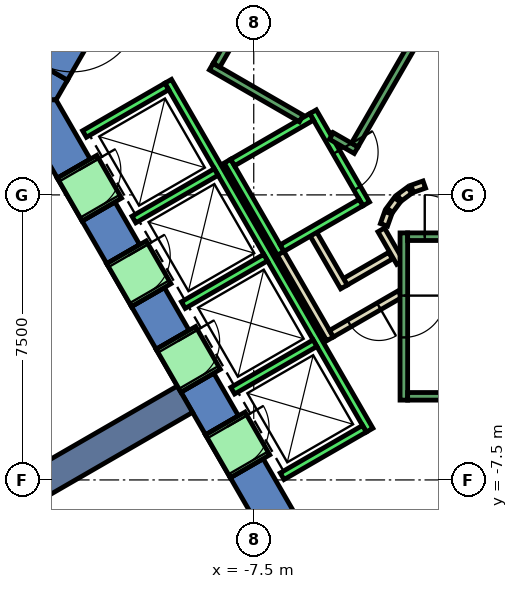
"""IFC4 building model, lengths in metres.
Left out: names, types, materials, properties, quantities, classifications, styles, units other than length and angle.
Written with IfcOpenShell. Run it as: python <this file> out.ifc"""

import sys

from ifc_helpers import new_model, si_unit, direction, frame, frame_2d, origin, place, context, subcontext, project, spatial, polyline, rectangle, outline, extrude, element, fill, save


model = new_model("IFC4")
c1 = context("Model", 3, precision=1e-05, world=origin(), true_north=direction((0.0, 1.0)))
c2 = subcontext(c1, "Body", "Model", "MODEL_VIEW")
j1 = project(units=[si_unit("LENGTHUNIT", "METRE"), si_unit("PLANEANGLEUNIT", "RADIAN")], contexts=[c1])
p1 = place(None, origin())
s1 = spatial("IfcSite", under=j1, at=p1, CompositionType="ELEMENT")
p2 = place(p1, origin())
s2 = spatial("IfcBuilding", under=s1, at=p2, CompositionType="ELEMENT")
p3 = place(p2, origin())
s3 = spatial("IfcBuildingStorey", under=s2, at=p3, CompositionType="ELEMENT", Elevation=0.0)
p4 = place(p3, frame((0.0, 0.0, -0.5)))
e1 = element("IfcWall", 1, at=p4, inside=s3, PredefinedType="SHEAR", context=c2, shape_type="SweptSolid", body=[
    extrude(outline(polyline([(-12.402, 3.02), (-13.267, 3.52), (-13.856, 2.5), (-12.702, 2.5), (-12.402, 3.02)])), origin(), (0.0, 0.0, 1.0), 9.05),
])
p5 = place(p3, frame((0.0, 0.0, 3.6)))
e2 = element("IfcWall", 2, at=p5, inside=s3, PredefinedType="SHEAR", context=c2, shape_type="SweptSolid", body=[
    extrude(outline(polyline([(-13.267, 3.52), (-12.402, 3.02), (-11.402, 4.752), (-12.267, 5.252), (-13.267, 3.52)])), origin(), (0.0, 0.0, 1.0), 4.95),
])
p6 = place(p3, frame((0.0, 0.0, -0.5)))
e3 = element("IfcWall", 3, at=p6, inside=s3, PredefinedType="SHEAR", context=c2, shape_type="SweptSolid", body=[
    extrude(outline(polyline([(-12.667, 0.44), (-11.801, 0.94), (-12.702, 2.5), (-13.856, 2.5), (-12.667, 0.44)])), origin(), (0.0, 0.0, 1.0), 9.05),
])
p7 = place(p3, frame((0.0, 0.0, -0.5)))
e4 = element("IfcWall", 4, at=p7, inside=s3, PredefinedType="SHEAR", context=c2, shape_type="SweptSolid", body=[
    extrude(outline(polyline([(-11.367, -1.811), (-10.501, -1.311), (-11.151, -0.186), (-12.017, -0.686), (-11.367, -1.811)])), origin(), (0.0, 0.0, 1.0), 9.05),
])
p8 = place(p3, frame((0.0, 0.0, -0.5)))
e5 = element("IfcWall", 5, at=p8, inside=s3, PredefinedType="SHEAR", context=c2, shape_type="SweptSolid", body=[
    extrude(outline(polyline([(-10.067, -4.063), (-9.201, -3.563), (-9.851, -2.437), (-10.717, -2.937), (-10.067, -4.063)])), origin(), (0.0, 0.0, 1.0), 9.05),
])
p9 = place(p3, frame((0.0, 0.0, -0.5)))
e6 = element("IfcWall", 6, at=p9, inside=s3, PredefinedType="SHEAR", context=c2, shape_type="SweptSolid", body=[
    extrude(outline(polyline([(-8.767, -6.314), (-7.902, -5.814), (-8.551, -4.689), (-9.417, -5.189), (-8.767, -6.314)])), origin(), (0.0, 0.0, 1.0), 9.05),
])
p10 = place(p3, frame((0.0, 0.0, -0.5)))
e7 = element("IfcWall", 7, at=p10, inside=s3, PredefinedType="SHEAR", context=c2, shape_type="SweptSolid", body=[
    extrude(outline(polyline([(-7.252, -6.94), (-8.117, -7.44), (-6.928, -9.5), (-6.351, -8.5), (-7.252, -6.94)])), origin(), (0.0, 0.0, 1.0), 9.05),
])
p11 = place(p3, frame((0.0, 0.0, 3.6)))
e8 = element("IfcWall", 8, at=p11, inside=s3, PredefinedType="SHEAR", context=c2, shape_type="SweptSolid", body=[
    extrude(outline(polyline([(-12.017, -0.686), (-11.151, -0.186), (-11.801, 0.94), (-12.667, 0.44), (-12.017, -0.686)])), origin(), (0.0, 0.0, 1.0), 4.95),
])
p12 = place(p3, frame((0.0, 0.0, 3.6)))
e9 = element("IfcWall", 9, at=p12, inside=s3, PredefinedType="SHEAR", context=c2, shape_type="SweptSolid", body=[
    extrude(outline(polyline([(-10.717, -2.937), (-9.851, -2.437), (-10.501, -1.311), (-11.367, -1.811), (-10.717, -2.937)])), origin(), (0.0, 0.0, 1.0), 4.95),
])
p13 = place(p3, frame((0.0, 0.0, 3.6)))
e10 = element("IfcWall", 10, at=p13, inside=s3, PredefinedType="SHEAR", context=c2, shape_type="SweptSolid", body=[
    extrude(outline(polyline([(-9.417, -5.189), (-8.551, -4.689), (-9.201, -3.563), (-10.067, -4.063), (-9.417, -5.189)])), origin(), (0.0, 0.0, 1.0), 4.95),
])
p14 = place(p3, frame((0.0, 0.0, 3.6)))
e11 = element("IfcWall", 11, at=p14, inside=s3, PredefinedType="SHEAR", context=c2, shape_type="SweptSolid", body=[
    extrude(outline(polyline([(-8.117, -7.44), (-7.252, -6.94), (-7.902, -5.814), (-8.767, -6.314), (-8.117, -7.44)])), origin(), (0.0, 0.0, 1.0), 4.95),
])
p15 = place(p3, frame((-9.31, -5.375, -0.5), z_axis=(0.0, 0.0, 1.0), x_axis=(-0.866017533419, -0.500013631625, 0.0)))
e12 = element("IfcWall", 12, at=p15, inside=s3, PredefinedType="SHEAR", context=c2, shape_type="SweptSolid", body=[
    extrude(rectangle(XDim=9.0, YDim=0.8, at=frame_2d((4.5, 0.0))), origin(), (0.0, 0.0, 1.0), 9.05),
])
p16 = place(p3, frame((-3.9, -1.599, 0.0), z_axis=(0.0, 0.0, 1.0), x_axis=(-0.865969445389, -0.500096910261, 0.0)))
e13 = element("IfcWall", 13, at=p16, inside=s3, PredefinedType="PARTITIONING", context=c2, shape_type="SweptSolid", body=[
    extrude(rectangle(XDim=1.373, YDim=0.2, at=frame_2d((0.687, 0.0))), origin(), (0.0, 0.0, 1.0), 8.55),
])
p17 = place(p3, frame((-5.126, -2.422, 0.0), z_axis=(0.0, 0.0, 1.0), x_axis=(-0.500062241894, 0.865989465428, 0.0)))
e14 = element("IfcWall", 14, at=p17, inside=s3, PredefinedType="PARTITIONING", context=c2, shape_type="SweptSolid", body=[
    extrude(rectangle(XDim=1.7, YDim=0.2, at=frame_2d((0.85, 0.0))), origin(), (0.0, 0.0, 1.0), 8.55),
])
p18 = place(p3, frame((-5.492, -3.788, 0.0), z_axis=(0.0, 0.0, 1.0), x_axis=(-0.500008949224, 0.866020236886, 0.0)))
e15 = element("IfcWall", 15, at=p18, inside=s3, PredefinedType="PARTITIONING", context=c2, shape_type="SweptSolid", body=[
    extrude(rectangle(XDim=2.68, YDim=0.2, at=frame_2d((1.34, 0.0))), origin(), (0.0, 0.0, 1.0), 8.55),
])
p19 = place(p3, frame((-4.145, -0.92, 0.0), z_axis=(0.0, 0.0, 1.0), x_axis=(0.499743786207, -0.866173278362, 0.0)))
e16 = element("IfcWall", 16, at=p19, inside=s3, PredefinedType="PARTITIONING", context=c2, shape_type="SweptSolid", body=[
    extrude(rectangle(XDim=0.991, YDim=0.2, at=frame_2d((0.495, 0.0))), origin(), (0.0, 0.0, 1.0), 8.55),
])
p20 = place(p3, frame((-3.65, -2.61, 0.0), z_axis=(0.0, 0.0, 1.0), x_axis=(-0.866072462134, -0.499918483688, 0.0)))
e17 = element("IfcWall", 17, at=p20, inside=s3, PredefinedType="PARTITIONING", context=c2, shape_type="SweptSolid", body=[
    extrude(rectangle(XDim=2.084, YDim=0.2, at=frame_2d((1.042, 0.0))), origin(), (0.0, 0.0, 1.0), 8.55),
])
p21 = place(p20, frame((0.642, 0.0, 0.0)))
e18 = element("IfcOpeningElement", 18, at=p21, cuts=e17, PredefinedType="OPENING", context=c2, shape_type="SweptSolid", body=[
    extrude(rectangle(XDim=0.9, YDim=2.1, at=frame_2d((0.45, 1.05))), frame((0.0, 0.11, 0.0), z_axis=(0.0, -1.0, 0.0), x_axis=(1.0, 0.0, 0.0)), (0.0, 0.0, 1.0), 0.22),
])
p22 = place(p3, frame((-3.012, 0.273, 0.0), z_axis=(0.0, 0.0, 1.0), x_axis=(-0.942280615813, -0.334824194261, 0.0)))
e19 = element("IfcWall", 19, at=p22, inside=s3, PredefinedType="PARTITIONING", context=c2, shape_type="SweptSolid", body=[
    extrude(rectangle(XDim=0.338, YDim=0.2, at=frame_2d((0.169, 0.0))), origin(), (0.0, 0.0, 1.0), 8.55),
])
p23 = place(p3, frame((-3.397, 0.124, 0.0), z_axis=(0.0, 0.0, 1.0), x_axis=(-0.804311165252, -0.594208338422, 0.0)))
e20 = element("IfcWall", 20, at=p23, inside=s3, PredefinedType="PARTITIONING", context=c2, shape_type="SweptSolid", body=[
    extrude(rectangle(XDim=0.338, YDim=0.2, at=frame_2d((0.169, 0.0))), origin(), (0.0, 0.0, 1.0), 8.55),
])
p24 = place(p3, frame((-3.723, -0.131, 0.0), z_axis=(0.0, 0.0, 1.0), x_axis=(-0.594675113454, -0.803966112121, 0.0)))
e21 = element("IfcWall", 21, at=p24, inside=s3, PredefinedType="PARTITIONING", context=c2, shape_type="SweptSolid", body=[
    extrude(rectangle(XDim=0.338, YDim=0.2, at=frame_2d((0.169, 0.0))), origin(), (0.0, 0.0, 1.0), 8.55),
])
p25 = place(p3, frame((-3.96, -0.47, 0.0), z_axis=(0.0, 0.0, 1.0), x_axis=(-0.334824194261, -0.942280615813, 0.0)))
e22 = element("IfcWall", 22, at=p25, inside=s3, PredefinedType="PARTITIONING", context=c2, shape_type="SweptSolid", body=[
    extrude(rectangle(XDim=0.338, YDim=0.2, at=frame_2d((0.169, 0.0))), origin(), (0.0, 0.0, 1.0), 8.55),
])
p26 = place(p3, frame((-2.771, 4.7, 0.0), z_axis=(0.0, 0.0, 1.0), x_axis=(0.499969479948, -0.866043023828, 0.0)))
e23 = element("IfcWall", 23, at=p26, inside=s3, PredefinedType="PARTITIONING", context=c2, shape_type="SweptSolid", body=[
    extrude(rectangle(XDim=4.99, YDim=0.2, at=frame_2d((2.495, 0.0))), origin(), (0.0, 0.0, 1.0), 8.55),
])
p27 = place(p26, frame((1.945, 0.0, 0.0)))
e24 = element("IfcOpeningElement", 24, at=p27, cuts=e23, PredefinedType="OPENING", context=c2, shape_type="SweptSolid", body=[
    extrude(rectangle(XDim=1.0, YDim=2.1, at=frame_2d((0.5, 1.05))), frame((0.0, 0.11, 0.0), z_axis=(0.0, -1.0, 0.0), x_axis=(1.0, 0.0, 0.0)), (0.0, 0.0, 1.0), 0.22),
])
p28 = place(p3, frame((-18.107, 2.457, 0.0), z_axis=(0.0, 0.0, 1.0), x_axis=(0.499997929316, 0.866026599291, 0.0)))
e25 = element("IfcWall", 25, at=p28, inside=s3, PredefinedType="PARTITIONING", context=c2, shape_type="SweptSolid", body=[
    extrude(rectangle(XDim=18.182, YDim=0.1, at=frame_2d((9.091, 0.0))), origin(), (0.0, 0.0, 1.0), 8.55),
])
p29 = place(p28, frame((4.754, 0.0, 0.0)))
e26 = element("IfcOpeningElement", 26, at=p29, cuts=e25, PredefinedType="OPENING", context=c2, shape_type="SweptSolid", body=[
    extrude(rectangle(XDim=1.8, YDim=2.1, at=frame_2d((0.9, 1.05))), frame((0.0, 0.06, 0.0), z_axis=(0.0, -1.0, 0.0), x_axis=(1.0, 0.0, 0.0)), (0.0, 0.0, 1.0), 0.12),
])
p30 = place(p3, frame((-12.18, 5.202, 0.0), z_axis=(0.0, 0.0, 1.0), x_axis=(-0.50002537861, -0.866010750942, 0.0)))
e27 = element("IfcWall", 27, at=p30, inside=s3, PredefinedType="PARTITIONING", context=c2, shape_type="SweptSolid", body=[
    extrude(rectangle(XDim=2.0, YDim=0.2, at=frame_2d((1.0, 0.0))), origin(), (0.0, 0.0, 1.0), 2.4),
])
p31 = place(p30, frame((0.19, 0.0, 0.0)))
e28 = element("IfcOpeningElement", 28, at=p31, cuts=e27, PredefinedType="OPENING", context=c2, shape_type="SweptSolid", body=[
    extrude(rectangle(XDim=1.8, YDim=2.1, at=frame_2d((0.9, 1.05))), frame((0.0, 0.11, 0.0), z_axis=(0.0, -1.0, 0.0), x_axis=(1.0, 0.0, 0.0)), (0.0, 0.0, 1.0), 0.22),
])
p32 = place(p3, frame((-5.94, 2.188, 0.0), z_axis=(0.0, 0.0, 1.0), x_axis=(0.49994636267, -0.866056369097, 0.0)))
e29 = element("IfcWall", 29, at=p32, inside=s3, PredefinedType="STANDARD", context=c2, shape_type="SweptSolid", body=[
    extrude(rectangle(XDim=2.8, YDim=0.2, at=frame_2d((1.4, 0.0))), origin(), (0.0, 0.0, 1.0), 8.55),
])
p33 = place(p32, frame((1.225, 0.0, 0.0)))
e30 = element("IfcOpeningElement", 30, at=p33, cuts=e29, PredefinedType="OPENING", context=c2, shape_type="SweptSolid", body=[
    extrude(rectangle(XDim=1.1, YDim=2.1, at=frame_2d((0.55, 1.05))), frame((0.0, 0.11, 0.0), z_axis=(0.0, -1.0, 0.0), x_axis=(1.0, 0.0, 0.0)), (0.0, 0.0, 1.0), 0.22),
])
p34 = place(p3, frame((-8.192, 0.888, 0.0), z_axis=(0.0, 0.0, 1.0), x_axis=(0.49994636267, -0.866056369097, 0.0)))
e31 = element("IfcWall", 31, at=p34, inside=s3, PredefinedType="STANDARD", context=c2, shape_type="SweptSolid", body=[
    extrude(rectangle(XDim=2.8, YDim=0.2, at=frame_2d((1.4, 0.0))), origin(), (0.0, 0.0, 1.0), 8.55),
])
for number, where, z_axis, x_axis in (
    (32, (-5.977, 2.052, 0.0), (0.0, 0.0, 1.0), (-0.866, -0.5, 0.0)),
    (33, (-4.677, -0.2, 0.0), (0.0, 0.0, 1.0), (-0.866, -0.5, 0.0)),
):
    element("IfcWall", number, at=place(p3, frame(where, z_axis=z_axis, x_axis=x_axis)), inside=s3, PredefinedType="STANDARD", context=c2, shape_type="SweptSolid", body=[
        extrude(rectangle(XDim=2.399, YDim=0.2, at=frame_2d((1.2, 0.0))), origin(), (0.0, 0.0, 1.0), 8.55),
    ])
p35 = place(p3, frame((-9.751, 2.99, 0.0), z_axis=(0.0, 0.0, 1.0), x_axis=(0.50000090737, -0.866024879913, 0.0)))
e34 = element("IfcWall", 34, at=p35, inside=s3, PredefinedType="STANDARD", context=c2, shape_type="SweptSolid", body=[
    extrude(rectangle(XDim=10.6, YDim=0.2, at=frame_2d((5.3, 0.0))), origin(), (0.0, 0.0, 1.0), 8.55),
])
p36 = place(p3, frame((-9.788, 2.853, 0.0), z_axis=(0.0, 0.0, 1.0), x_axis=(-0.865998541277, -0.500046524342, 0.0)))
e35 = element("IfcWall", 35, at=p36, inside=s3, PredefinedType="STANDARD", context=c2, shape_type="SweptSolid", body=[
    extrude(rectangle(XDim=2.5, YDim=0.2, at=frame_2d((1.25, 0.0))), origin(), (0.0, 0.0, 1.0), 8.55),
])
for number, where, z_axis, x_axis in (
    (36, (-8.488, 0.602, 0.0), (0.0, 0.0, 1.0), (-0.866, -0.5, 0.0)),
    (37, (-7.188, -1.65, 0.0), (0.0, 0.0, 1.0), (-0.866, -0.5, 0.0)),
    (38, (-5.888, -3.902, 0.0), (0.0, 0.0, 1.0), (-0.866, -0.5, 0.0)),
    (39, (-4.588, -6.153, 0.0), (0.0, 0.0, 1.0), (-0.866, -0.5, 0.0)),
):
    element("IfcWall", number, at=place(p3, frame(where, z_axis=z_axis, x_axis=x_axis)), inside=s3, PredefinedType="STANDARD", context=c2, shape_type="SweptSolid", body=[
        extrude(rectangle(XDim=2.5, YDim=0.2, at=frame_2d((1.25, 0.0))), origin(), (0.0, 0.0, 1.0), 8.55),
    ])
p37 = place(p3, frame((-12.148, 0.74, 0.0), z_axis=(0.0, 0.0, 1.0), x_axis=(0.500221244143, -0.865897630733, 0.0)))
e40 = element("IfcWall", 40, at=p37, inside=s3, PredefinedType="STANDARD", context=c2, shape_type="SweptSolid", body=[
    extrude(rectangle(XDim=1.299, YDim=1.2, at=frame_2d((0.65, 0.0))), origin(), (0.0, 0.0, 1.0), 2.4),
])
p38 = place(p37, frame((0.1, 0.0, 0.0)))
e41 = element("IfcOpeningElement", 41, at=p38, cuts=e40, PredefinedType="OPENING", context=c2, shape_type="SweptSolid", body=[
    extrude(rectangle(XDim=1.1, YDim=2.3, at=frame_2d((0.55, 1.15))), frame((0.0, 0.61, 0.0), z_axis=(0.0, -1.0, 0.0), x_axis=(1.0, 0.0, 0.0)), (0.0, 0.0, 1.0), 1.22),
])
p39 = place(p3, frame((-10.848, -1.511, 0.0), z_axis=(0.0, 0.0, 1.0), x_axis=(0.49989585183, -0.866085525409, 0.0)))
e42 = element("IfcWall", 42, at=p39, inside=s3, PredefinedType="STANDARD", context=c2, shape_type="SweptSolid", body=[
    extrude(rectangle(XDim=1.3, YDim=1.2, at=frame_2d((0.65, 0.0))), origin(), (0.0, 0.0, 1.0), 2.4),
])
p40 = place(p39, frame((0.1, 0.0, 0.0)))
e43 = element("IfcOpeningElement", 43, at=p40, cuts=e42, PredefinedType="OPENING", context=c2, shape_type="SweptSolid", body=[
    extrude(rectangle(XDim=1.1, YDim=2.3, at=frame_2d((0.55, 1.15))), frame((0.0, 0.61, 0.0), z_axis=(0.0, -1.0, 0.0), x_axis=(1.0, 0.0, 0.0)), (0.0, 0.0, 1.0), 1.22),
])
p41 = place(p3, frame((-9.548, -3.763, 0.0), z_axis=(0.0, 0.0, 1.0), x_axis=(0.500036693733, -0.866004217611, 0.0)))
e44 = element("IfcWall", 44, at=p41, inside=s3, PredefinedType="STANDARD", context=c2, shape_type="SweptSolid", body=[
    extrude(rectangle(XDim=1.3, YDim=1.2, at=frame_2d((0.65, 0.0))), origin(), (0.0, 0.0, 1.0), 2.4),
])
p42 = place(p41, frame((0.1, 0.0, 0.0)))
e45 = element("IfcOpeningElement", 45, at=p42, cuts=e44, PredefinedType="OPENING", context=c2, shape_type="SweptSolid", body=[
    extrude(rectangle(XDim=1.1, YDim=2.3, at=frame_2d((0.55, 1.15))), frame((0.0, 0.61, 0.0), z_axis=(0.0, -1.0, 0.0), x_axis=(1.0, 0.0, 0.0)), (0.0, 0.0, 1.0), 1.22),
])
p43 = place(p3, frame((-8.248, -6.015, 0.0), z_axis=(0.0, 0.0, 1.0), x_axis=(0.500362116554, -0.865816234728, 0.0)))
e46 = element("IfcWall", 46, at=p43, inside=s3, PredefinedType="STANDARD", context=c2, shape_type="SweptSolid", body=[
    extrude(rectangle(XDim=1.299, YDim=1.2, at=frame_2d((0.65, 0.0))), origin(), (0.0, 0.0, 1.0), 2.4),
])
p44 = place(p43, frame((0.1, 0.0, 0.0)))
e47 = element("IfcOpeningElement", 47, at=p44, cuts=e46, PredefinedType="OPENING", context=c2, shape_type="SweptSolid", body=[
    extrude(rectangle(XDim=1.1, YDim=2.3, at=frame_2d((0.55, 1.15))), frame((0.0, 0.61, 0.0), z_axis=(0.0, -1.0, 0.0), x_axis=(1.0, 0.0, 0.0)), (0.0, 0.0, 1.0), 1.22),
])
p45 = place(p3, frame((-3.55, -1.0, 0.0), z_axis=(0.0, 0.0, 1.0), x_axis=(0.0, -1.0, 0.0)))
e48 = element("IfcWall", 48, at=p45, inside=s3, PredefinedType="STANDARD", context=c2, shape_type="SweptSolid", body=[
    extrude(rectangle(XDim=4.4, YDim=0.2, at=frame_2d((2.2, 0.0))), origin(), (0.0, 0.0, 1.0), 8.55),
])
p46 = place(p45, frame((1.65, 0.0, 0.0)))
e49 = element("IfcOpeningElement", 49, at=p46, cuts=e48, PredefinedType="OPENING", context=c2, shape_type="SweptSolid", body=[
    extrude(rectangle(XDim=1.1, YDim=2.2, at=frame_2d((0.55, 1.1))), frame((0.0, 0.11, 0.0), z_axis=(0.0, -1.0, 0.0), x_axis=(1.0, 0.0, 0.0)), (0.0, 0.0, 1.0), 0.22),
])
p47 = place(p3, frame((-3.45, -1.1, 0.0), z_axis=(0.0, 0.0, 1.0), x_axis=(1.0, 0.0, 0.0)))
e50 = element("IfcWall", 50, at=p47, inside=s3, PredefinedType="STANDARD", context=c2, shape_type="SweptSolid", body=[
    extrude(rectangle(XDim=6.9, YDim=0.2, at=frame_2d((3.45, 0.0))), origin(), (0.0, 0.0, 1.0), 8.55),
])
p48 = place(p47, frame((0.45, 0.0, 0.0)))
e51 = element("IfcOpeningElement", 51, at=p48, cuts=e50, PredefinedType="OPENING", context=c2, shape_type="SweptSolid", body=[
    extrude(rectangle(XDim=1.1, YDim=2.2, at=frame_2d((0.55, 1.1))), frame((0.0, 0.11, 0.0), z_axis=(0.0, -1.0, 0.0), x_axis=(1.0, 0.0, 0.0)), (0.0, 0.0, 1.0), 0.22),
])
p49 = place(p3, frame((-3.45, -5.3, 0.0), z_axis=(0.0, 0.0, 1.0), x_axis=(1.0, 0.0, 0.0)))
e52 = element("IfcWall", 52, at=p49, inside=s3, PredefinedType="STANDARD", context=c2, shape_type="SweptSolid", body=[
    extrude(rectangle(XDim=6.9, YDim=0.2, at=frame_2d((3.45, 0.0))), origin(), (0.0, 0.0, 1.0), 8.55),
])
p50 = place(p3, frame((-6.25, 2.01, 0.0), z_axis=(0.0, 0.0, 1.0), x_axis=(-0.86611865017, 0.499838457731, 0.0)))
e53 = element("IfcWall", 53, at=p50, inside=s3, PredefinedType="STANDARD", context=c2, shape_type="SweptSolid", body=[
    extrude(rectangle(XDim=2.733, YDim=0.2, at=frame_2d((1.366, 0.0))), origin(), (0.0, 0.0, 1.0), 8.55),
])
p51 = place(p3, frame((-4.806, 1.176, 0.0), z_axis=(0.0, 0.0, 1.0), x_axis=(-0.866558586415, 0.499075361355, 0.0)))
e54 = element("IfcWall", 54, at=p51, inside=s3, PredefinedType="STANDARD", context=c2, shape_type="SweptSolid", body=[
    extrude(rectangle(XDim=0.751, YDim=0.2, at=frame_2d((0.376, 0.0))), origin(), (0.0, 0.0, 1.0), 8.55),
])
p52 = place(p3, frame((-1.393, 7.288, 0.0), z_axis=(0.0, 0.0, 1.0), x_axis=(-0.499963383562, -0.866046543262, 0.0)))
e55 = element("IfcWall", 55, at=p52, inside=s3, PredefinedType="STANDARD", context=c2, shape_type="SweptSolid", body=[
    extrude(rectangle(XDim=6.9, YDim=0.2, at=frame_2d((3.45, 0.0))), origin(), (0.0, 0.0, 1.0), 8.55),
])
p53 = place(p52, frame((0.45, 0.0, 0.0)))
e56 = element("IfcOpeningElement", 56, at=p53, cuts=e55, PredefinedType="OPENING", context=c2, shape_type="SweptSolid", body=[
    extrude(rectangle(XDim=1.1, YDim=2.2, at=frame_2d((0.55, 1.1))), frame((0.0, 0.11, 0.0), z_axis=(0.0, -1.0, 0.0), x_axis=(1.0, 0.0, 0.0)), (0.0, 0.0, 1.0), 0.22),
])
p54 = place(p3, frame((-5.03, 9.388, 0.0), z_axis=(0.0, 0.0, 1.0), x_axis=(-0.499978703459, -0.866037698999, 0.0)))
e57 = element("IfcWall", 57, at=p54, inside=s3, PredefinedType="STANDARD", context=c2, shape_type="SweptSolid", body=[
    extrude(rectangle(XDim=6.9, YDim=0.2, at=frame_2d((3.45, 0.0))), origin(), (0.0, 0.0, 1.0), 8.55),
])
p55 = place(p21, origin())
e58 = element("IfcDoor", 58, at=p55, inside=s3, OperationType="SINGLE_SWING_LEFT", PredefinedType="DOOR", context=c2, shape_type="SweptSolid", body=[
    extrude(rectangle(XDim=0.9, YDim=2.1, at=frame_2d((0.45, 1.05))), frame((0.0, 0.025, 0.0), z_axis=(0.0, -1.0, 0.0), x_axis=(1.0, 0.0, 0.0)), (0.0, 0.0, 1.0), 0.05),
])
fill(e18, e58)
p56 = place(p31, origin())
e59 = element("IfcDoor", 59, at=p56, inside=s3, OperationType="DOUBLE_DOOR_SINGLE_SWING", PredefinedType="DOOR", context=c2, shape_type="SweptSolid", body=[
    extrude(rectangle(XDim=1.8, YDim=2.1, at=frame_2d((0.9, 1.05))), frame((0.0, 0.025, 0.0), z_axis=(0.0, -1.0, 0.0), x_axis=(1.0, 0.0, 0.0)), (0.0, 0.0, 1.0), 0.05),
])
fill(e28, e59)
p57 = place(p38, origin())
e60 = element("IfcDoor", 60, at=p57, inside=s3, OperationType="SLIDING_TO_LEFT", PredefinedType="DOOR", context=c2, shape_type="SweptSolid", body=[
    extrude(rectangle(XDim=1.1, YDim=2.3, at=frame_2d((0.55, 1.15))), frame((0.0, 0.025, 0.0), z_axis=(0.0, -1.0, 0.0), x_axis=(1.0, 0.0, 0.0)), (0.0, 0.0, 1.0), 0.05),
])
fill(e41, e60)
p58 = place(p40, origin())
e61 = element("IfcDoor", 61, at=p58, inside=s3, OperationType="SLIDING_TO_LEFT", PredefinedType="DOOR", context=c2, shape_type="SweptSolid", body=[
    extrude(rectangle(XDim=1.1, YDim=2.3, at=frame_2d((0.55, 1.15))), frame((0.0, 0.025, 0.0), z_axis=(0.0, -1.0, 0.0), x_axis=(1.0, 0.0, 0.0)), (0.0, 0.0, 1.0), 0.05),
])
fill(e43, e61)
p59 = place(p42, origin())
e62 = element("IfcDoor", 62, at=p59, inside=s3, OperationType="SLIDING_TO_LEFT", PredefinedType="DOOR", context=c2, shape_type="SweptSolid", body=[
    extrude(rectangle(XDim=1.1, YDim=2.3, at=frame_2d((0.55, 1.15))), frame((0.0, 0.025, 0.0), z_axis=(0.0, -1.0, 0.0), x_axis=(1.0, 0.0, 0.0)), (0.0, 0.0, 1.0), 0.05),
])
fill(e45, e62)
p60 = place(p44, origin())
e63 = element("IfcDoor", 63, at=p60, inside=s3, OperationType="SLIDING_TO_LEFT", PredefinedType="DOOR", context=c2, shape_type="SweptSolid", body=[
    extrude(rectangle(XDim=1.1, YDim=2.3, at=frame_2d((0.55, 1.15))), frame((0.0, 0.025, 0.0), z_axis=(0.0, -1.0, 0.0), x_axis=(1.0, 0.0, 0.0)), (0.0, 0.0, 1.0), 0.05),
])
fill(e47, e63)
p61 = place(p33, origin())
e64 = element("IfcDoor", 64, at=p61, inside=s3, OperationType="SLIDING_TO_LEFT", PredefinedType="DOOR", context=c2, shape_type="SweptSolid", body=[
    extrude(rectangle(XDim=1.1, YDim=2.1, at=frame_2d((0.55, 1.05))), frame((0.0, 0.025, 0.0), z_axis=(0.0, -1.0, 0.0), x_axis=(1.0, 0.0, 0.0)), (0.0, 0.0, 1.0), 0.05),
])
fill(e30, e64)
p62 = place(p48, origin())
e65 = element("IfcDoor", 65, at=p62, inside=s3, OperationType="SINGLE_SWING_LEFT", PredefinedType="DOOR", context=c2, shape_type="SweptSolid", body=[
    extrude(rectangle(XDim=1.1, YDim=2.2, at=frame_2d((0.55, 1.1))), frame((0.0, 0.025, 0.0), z_axis=(0.0, -1.0, 0.0), x_axis=(1.0, 0.0, 0.0)), (0.0, 0.0, 1.0), 0.05),
])
fill(e51, e65)
p63 = place(p46, origin())
e66 = element("IfcDoor", 66, at=p63, inside=s3, OperationType="SINGLE_SWING_LEFT", PredefinedType="DOOR", context=c2, shape_type="SweptSolid", body=[
    extrude(rectangle(XDim=1.1, YDim=2.2, at=frame_2d((0.55, 1.1))), frame((0.0, 0.025, 0.0), z_axis=(0.0, -1.0, 0.0), x_axis=(1.0, 0.0, 0.0)), (0.0, 0.0, 1.0), 0.05),
])
fill(e49, e66)
save(model, sys.argv[1])
